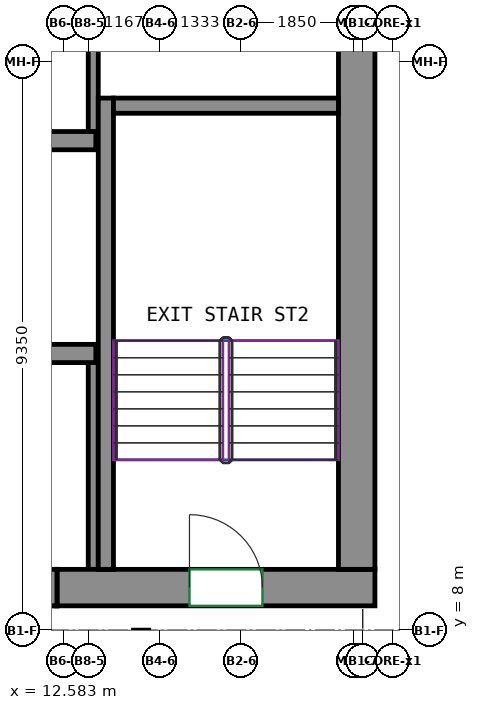
"""IFC4 building model, lengths in metres.
Left out: names, types, materials, properties, quantities, classifications, styles, units other than length and angle.
Written with IfcOpenShell. Run it as: python <this file> out.ifc"""

import sys

from ifc_helpers import new_model, si_unit, direction, frame, frame_2d, origin, place, context, subcontext, project, spatial, rectangle, extrude, source, transform, mapped, element, fill, save


model = new_model("IFC4")
c1 = context("Model", 3, precision=1e-05, world=origin(), true_north=direction((0.0, 1.0)))
c2 = subcontext(c1, "Body", "Model", "MODEL_VIEW")
j1 = project(units=[si_unit("LENGTHUNIT", "METRE"), si_unit("PLANEANGLEUNIT", "RADIAN")], contexts=[c1])
p1 = place(None, origin())
s1 = spatial("IfcSite", under=j1, at=p1, CompositionType="ELEMENT")
p2 = place(p1, origin())
s2 = spatial("IfcBuilding", under=s1, at=p2, CompositionType="ELEMENT")
p3 = place(p2, frame((0.0, 0.0, 323.8)))
s3 = spatial("IfcBuildingStorey", under=s2, at=p3, CompositionType="ELEMENT", Elevation=323.8)
m1 = source(origin(), c2, "Body", "SweptSolid", [
    extrude(rectangle(XDim=5.23, YDim=0.6, at=frame_2d((2.615, 0.0))), origin(), (0.0, 0.0, 1.0), 5.0),
])
p4 = place(p3, frame((12.47, 8.7, -0.4), z_axis=(0.0, 0.0, 1.0), x_axis=(1.0, 0.0, 0.0)))
e1 = element("IfcWall", 1, at=p4, inside=s3, PredefinedType="SHEAR", context=c2, shape_type="MappedRepresentation", body=[
    mapped(m1, transform((0.0, 0.0, 0.0))),
])
p5 = place(p4, frame((2.18, 0.0, 0.4)))
e2 = element("IfcOpeningElement", 2, at=p5, cuts=e1, PredefinedType="OPENING", context=c2, shape_type="SweptSolid", body=[
    extrude(rectangle(XDim=1.2, YDim=2.1, at=frame_2d((0.6, 1.05))), frame((0.0, 0.31, 0.0), z_axis=(0.0, -1.0, 0.0), x_axis=(1.0, 0.0, 0.0)), (0.0, 0.0, 1.0), 0.62),
])
m2 = source(origin(), c2, "Body", "SweptSolid", [
    extrude(rectangle(XDim=12.0, YDim=0.6, at=frame_2d((6.0, 0.0))), origin(), (0.0, 0.0, 1.0), 5.0),
])
p6 = place(p3, frame((17.4, 9.0, -0.4), z_axis=(0.0, 0.0, 1.0), x_axis=(0.0, 1.0, 0.0)))
e3 = element("IfcWall", 3, at=p6, inside=s3, PredefinedType="SHEAR", context=c2, shape_type="MappedRepresentation", body=[
    mapped(m2, transform((0.0, 0.0, 0.0))),
])
m3 = source(origin(), c2, "Body", "SweptSolid", [
    extrude(rectangle(XDim=7.75, YDim=0.25, at=frame_2d((3.875, 0.0))), origin(), (0.0, 0.0, 1.0), 5.0),
])
p7 = place(p3, frame((13.275, 9.0, -0.4), z_axis=(0.0, 0.0, 1.0), x_axis=(0.0, 1.0, 0.0)))
e4 = element("IfcWall", 4, at=p7, inside=s3, PredefinedType="SHEAR", context=c2, shape_type="MappedRepresentation", body=[
    mapped(m3, transform((0.0, 0.0, 0.0))),
])
m4 = source(origin(), c2, "Body", "SweptSolid", [
    extrude(rectangle(XDim=3.7, YDim=0.25, at=frame_2d((1.85, 0.0))), origin(), (0.0, 0.0, 1.0), 5.0),
])
p8 = place(p3, frame((13.4, 16.625, -0.4), z_axis=(0.0, 0.0, 1.0), x_axis=(1.0, 0.0, 0.0)))
e5 = element("IfcWall", 5, at=p8, inside=s3, PredefinedType="SHEAR", context=c2, shape_type="MappedRepresentation", body=[
    mapped(m4, transform((0.0, 0.0, 0.0))),
])
m5 = source(origin(), c2, "Body", "SweptSolid", [
    extrude(rectangle(XDim=2.82, YDim=0.3, at=frame_2d((1.41, 0.0))), origin(), (0.0, 0.0, 1.0), 5.0),
])
p9 = place(p3, frame((10.29, 12.55, -0.4), z_axis=(0.0, 0.0, 1.0), x_axis=(1.0, 0.0, 0.0)))
e6 = element("IfcWall", 6, at=p9, inside=s3, PredefinedType="SHEAR", context=c2, shape_type="MappedRepresentation", body=[
    mapped(m5, transform((0.0, 0.0, 0.0))),
])
m6 = source(origin(), c2, "Body", "SweptSolid", [
    extrude(rectangle(XDim=2.691, YDim=0.3, at=frame_2d((1.346, 0.0))), origin(), (0.0, 0.0, 1.0), 5.0),
])
p10 = place(p3, frame((10.419, 16.05, -0.4), z_axis=(0.0, 0.0, 1.0), x_axis=(1.0, 0.0, 0.0)))
e7 = element("IfcWall", 7, at=p10, inside=s3, PredefinedType="SHEAR", context=c2, shape_type="MappedRepresentation", body=[
    mapped(m6, transform((0.0, 0.0, 0.0))),
])
m7 = source(origin(), c2, "Body", "SweptSolid", [
    extrude(rectangle(XDim=1.4, YDim=0.6, at=frame_2d((0.7, 0.0))), origin(), (0.0, 0.0, 1.0), 0.65),
])
p11 = place(p3, frame((11.07, 8.7, 3.95), z_axis=(0.0, 0.0, 1.0), x_axis=(1.0, 0.0, 0.0)))
e8 = element("IfcWall", 8, at=p11, inside=s3, PredefinedType="SHEAR", context=c2, shape_type="MappedRepresentation", body=[
    mapped(m7, transform((0.0, 0.0, 0.0))),
])
m8 = source(origin(), c2, "Body", "SweptSolid", [
    extrude(rectangle(XDim=4.8, YDim=0.165, at=frame_2d((2.4, 0.0))), origin(), (0.0, 0.0, 1.0), 4.6),
])
p12 = place(p3, frame((13.067, 16.2, 0.0), z_axis=(0.0, 0.0, 1.0), x_axis=(0.0, 1.0, 0.0)))
e9 = element("IfcWall", 9, at=p12, inside=s3, PredefinedType="PARTITIONING", context=c2, shape_type="MappedRepresentation", body=[
    mapped(m8, transform((0.0, 0.0, 0.0))),
])
m9 = source(origin(), c2, "Body", "SweptSolid", [
    extrude(rectangle(XDim=3.4, YDim=0.165, at=frame_2d((1.7, 0.0))), origin(), (0.0, 0.0, 1.0), 4.6),
])
p13 = place(p3, frame((13.067, 9.0, 0.0), z_axis=(0.0, 0.0, 1.0), x_axis=(0.0, 1.0, 0.0)))
e10 = element("IfcWall", 10, at=p13, inside=s3, PredefinedType="PARTITIONING", context=c2, shape_type="MappedRepresentation", body=[
    mapped(m9, transform((0.0, 0.0, 0.0))),
])
m10 = source(origin(), c2, "Body", "SweptSolid", [
    extrude(rectangle(XDim=1.4, YDim=0.6, at=frame_2d((0.7, 0.0))), origin(), (0.0, 0.0, 1.0), 2.7),
])
p14 = place(p3, frame((11.07, 8.7, 0.0), z_axis=(0.0, 0.0, 1.0), x_axis=(1.0, 0.0, 0.0)))
e11 = element("IfcWall", 11, at=p14, inside=s3, PredefinedType="PARTITIONING", context=c2, shape_type="MappedRepresentation", body=[
    mapped(m10, transform((0.0, 0.0, 0.0))),
])
p15 = place(p14, frame((0.25, 0.0, 0.0)))
e12 = element("IfcOpeningElement", 12, at=p15, cuts=e11, PredefinedType="OPENING", context=c2, shape_type="SweptSolid", body=[
    extrude(rectangle(XDim=0.9, YDim=2.1, at=frame_2d((0.45, 1.05))), frame((0.0, 0.31, 0.0), z_axis=(0.0, -1.0, 0.0), x_axis=(1.0, 0.0, 0.0)), (0.0, 0.0, 1.0), 0.62),
])
p16 = place(p5, origin())
e13 = element("IfcDoor", 13, at=p16, inside=s3, OperationType="DOUBLE_DOOR_SINGLE_SWING", PredefinedType="DOOR", context=c2, shape_type="SweptSolid", body=[
    extrude(rectangle(XDim=1.2, YDim=2.1, at=frame_2d((0.6, 1.05))), frame((0.0, 0.205, 0.0), z_axis=(0.0, -1.0, 0.0), x_axis=(1.0, 0.0, 0.0)), (0.0, 0.0, 1.0), 0.05),
])
fill(e2, e13)
save(model, sys.argv[1])
